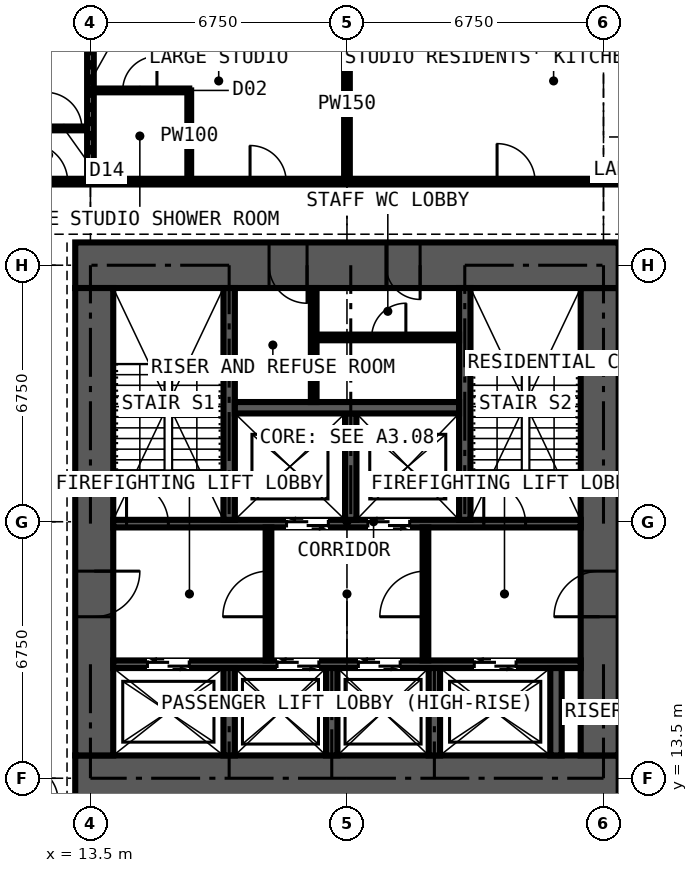
"""IFC4 building model, lengths in metres.
Left out: names, types, materials, properties, quantities, classifications, styles, units other than length and angle.
Written with IfcOpenShell. Run it as: python <this file> out.ifc"""

import sys

from ifc_helpers import new_model, si_unit, direction, frame, frame_2d, origin, place, context, subcontext, project, spatial, rectangle, extrude, element, fill, save


model = new_model("IFC4")
c1 = context("Model", 3, precision=1e-05, world=origin(), true_north=direction((0.0, 1.0)))
c2 = subcontext(c1, "Body", "Model", "MODEL_VIEW")
j1 = project(units=[si_unit("LENGTHUNIT", "METRE"), si_unit("PLANEANGLEUNIT", "RADIAN")], contexts=[c1])
p1 = place(None, origin())
s1 = spatial("IfcSite", under=j1, at=p1, CompositionType="ELEMENT")
p2 = place(p1, origin())
s2 = spatial("IfcBuilding", under=s1, at=p2, CompositionType="ELEMENT")
p3 = place(p2, frame((0.0, 0.0, 196.2)))
s3 = spatial("IfcBuildingStorey", under=s2, at=p3, CompositionType="ELEMENT", Elevation=196.2)
p4 = place(p3, frame((13.1, 13.5, 0.0), z_axis=(0.0, 0.0, 1.0), x_axis=(1.0, 0.0, 0.0)))
e1 = element("IfcWall", 1, at=p4, inside=s3, PredefinedType="SHEAR", context=c2, shape_type="SweptSolid", body=[
    extrude(rectangle(XDim=14.3, YDim=1.2, at=frame_2d((7.15, 0.0))), origin(), (0.0, 0.0, 1.0), 3.6),
])
p5 = place(p3, frame((26.9, 14.1, 0.0), z_axis=(0.0, 0.0, 1.0), x_axis=(0.0, 1.0, 0.0)))
e2 = element("IfcWall", 2, at=p5, inside=s3, PredefinedType="SHEAR", context=c2, shape_type="SweptSolid", body=[
    extrude(rectangle(XDim=12.3, YDim=1.0, at=frame_2d((6.15, 0.0))), origin(), (0.0, 0.0, 1.0), 3.6),
])
p6 = place(p5, frame((3.65, 0.0, 0.0)))
e3 = element("IfcOpeningElement", 3, at=p6, cuts=e2, PredefinedType="OPENING", context=c2, shape_type="SweptSolid", body=[
    extrude(rectangle(XDim=1.2, YDim=2.2, at=frame_2d((0.6, 1.1))), frame((0.0, 0.51, 0.0), z_axis=(0.0, -1.0, 0.0), x_axis=(1.0, 0.0, 0.0)), (0.0, 0.0, 1.0), 1.02),
])
p7 = place(p3, frame((27.4, 27.0, 0.0), z_axis=(0.0, 0.0, 1.0), x_axis=(-1.0, 0.0, 0.0)))
e4 = element("IfcWall", 4, at=p7, inside=s3, PredefinedType="SHEAR", context=c2, shape_type="SweptSolid", body=[
    extrude(rectangle(XDim=14.3, YDim=1.2, at=frame_2d((7.15, 0.0))), origin(), (0.0, 0.0, 1.0), 3.6),
])
p8 = place(p7, frame((5.225, 0.0, 0.0)))
e5 = element("IfcOpeningElement", 5, at=p8, cuts=e4, PredefinedType="OPENING", context=c2, shape_type="SweptSolid", body=[
    extrude(rectangle(XDim=0.9, YDim=2.2, at=frame_2d((0.45, 1.1))), frame((0.0, 0.61, 0.0), z_axis=(0.0, -1.0, 0.0), x_axis=(1.0, 0.0, 0.0)), (0.0, 0.0, 1.0), 1.22),
])
p9 = place(p7, frame((8.2, 0.0, 0.0)))
e6 = element("IfcOpeningElement", 6, at=p9, cuts=e4, PredefinedType="OPENING", context=c2, shape_type="SweptSolid", body=[
    extrude(rectangle(XDim=1.0, YDim=2.2, at=frame_2d((0.5, 1.1))), frame((0.0, 0.61, 0.0), z_axis=(0.0, -1.0, 0.0), x_axis=(1.0, 0.0, 0.0)), (0.0, 0.0, 1.0), 1.22),
])
p10 = place(p3, frame((13.6, 26.4, 0.0), z_axis=(0.0, 0.0, 1.0), x_axis=(0.0, -1.0, 0.0)))
e7 = element("IfcWall", 7, at=p10, inside=s3, PredefinedType="SHEAR", context=c2, shape_type="SweptSolid", body=[
    extrude(rectangle(XDim=12.3, YDim=1.0, at=frame_2d((6.15, 0.0))), origin(), (0.0, 0.0, 1.0), 3.6),
])
p11 = place(p10, frame((7.45, 0.0, 0.0)))
e8 = element("IfcOpeningElement", 8, at=p11, cuts=e7, PredefinedType="OPENING", context=c2, shape_type="SweptSolid", body=[
    extrude(rectangle(XDim=1.2, YDim=2.2, at=frame_2d((0.6, 1.1))), frame((0.0, 0.51, 0.0), z_axis=(0.0, -1.0, 0.0), x_axis=(1.0, 0.0, 0.0)), (0.0, 0.0, 1.0), 1.02),
])
p12 = place(p3, frame((14.1, 16.5, 0.0), z_axis=(0.0, 0.0, 1.0), x_axis=(1.0, 0.0, 0.0)))
e9 = element("IfcWall", 9, at=p12, inside=s3, PredefinedType="SHEAR", context=c2, shape_type="SweptSolid", body=[
    extrude(rectangle(XDim=12.3, YDim=0.2, at=frame_2d((6.15, 0.0))), origin(), (0.0, 0.0, 1.0), 3.6),
])
p13 = place(p12, frame((0.9, 0.0, 0.0)))
e10 = element("IfcOpeningElement", 10, at=p13, cuts=e9, PredefinedType="OPENING", context=c2, shape_type="SweptSolid", body=[
    extrude(rectangle(XDim=1.1, YDim=2.2, at=frame_2d((0.55, 1.1))), frame((0.0, 0.11, 0.0), z_axis=(0.0, -1.0, 0.0), x_axis=(1.0, 0.0, 0.0)), (0.0, 0.0, 1.0), 0.22),
])
p14 = place(p12, frame((4.31, 0.0, 0.0)))
e11 = element("IfcOpeningElement", 11, at=p14, cuts=e9, PredefinedType="OPENING", context=c2, shape_type="SweptSolid", body=[
    extrude(rectangle(XDim=1.1, YDim=2.2, at=frame_2d((0.55, 1.1))), frame((0.0, 0.11, 0.0), z_axis=(0.0, -1.0, 0.0), x_axis=(1.0, 0.0, 0.0)), (0.0, 0.0, 1.0), 0.22),
])
p15 = place(p12, frame((6.45, 0.0, 0.0)))
e12 = element("IfcOpeningElement", 12, at=p15, cuts=e9, PredefinedType="OPENING", context=c2, shape_type="SweptSolid", body=[
    extrude(rectangle(XDim=1.1, YDim=2.2, at=frame_2d((0.55, 1.1))), frame((0.0, 0.11, 0.0), z_axis=(0.0, -1.0, 0.0), x_axis=(1.0, 0.0, 0.0)), (0.0, 0.0, 1.0), 0.22),
])
p16 = place(p12, frame((9.5, 0.0, 0.0)))
e13 = element("IfcOpeningElement", 13, at=p16, cuts=e9, PredefinedType="OPENING", context=c2, shape_type="SweptSolid", body=[
    extrude(rectangle(XDim=1.1, YDim=2.2, at=frame_2d((0.55, 1.1))), frame((0.0, 0.11, 0.0), z_axis=(0.0, -1.0, 0.0), x_axis=(1.0, 0.0, 0.0)), (0.0, 0.0, 1.0), 0.22),
])
p17 = place(p3, frame((14.1, 20.2, 0.0), z_axis=(0.0, 0.0, 1.0), x_axis=(1.0, 0.0, 0.0)))
e14 = element("IfcWall", 14, at=p17, inside=s3, PredefinedType="SHEAR", context=c2, shape_type="SweptSolid", body=[
    extrude(rectangle(XDim=12.3, YDim=0.2, at=frame_2d((6.15, 0.0))), origin(), (0.0, 0.0, 1.0), 3.6),
])
p18 = place(p17, frame((4.56, 0.0, 0.0)))
e15 = element("IfcOpeningElement", 15, at=p18, cuts=e14, PredefinedType="OPENING", context=c2, shape_type="SweptSolid", body=[
    extrude(rectangle(XDim=1.1, YDim=2.2, at=frame_2d((0.55, 1.1))), frame((0.0, 0.11, 0.0), z_axis=(0.0, -1.0, 0.0), x_axis=(1.0, 0.0, 0.0)), (0.0, 0.0, 1.0), 0.22),
])
p19 = place(p17, frame((6.7, 0.0, 0.0)))
e16 = element("IfcOpeningElement", 16, at=p19, cuts=e14, PredefinedType="OPENING", context=c2, shape_type="SweptSolid", body=[
    extrude(rectangle(XDim=1.1, YDim=2.2, at=frame_2d((0.55, 1.1))), frame((0.0, 0.11, 0.0), z_axis=(0.0, -1.0, 0.0), x_axis=(1.0, 0.0, 0.0)), (0.0, 0.0, 1.0), 0.22),
])
p20 = place(p17, frame((0.35, 0.0, 0.0)))
e17 = element("IfcOpeningElement", 17, at=p20, cuts=e14, PredefinedType="OPENING", context=c2, shape_type="SweptSolid", body=[
    extrude(rectangle(XDim=1.1, YDim=2.2, at=frame_2d((0.55, 1.1))), frame((0.0, 0.11, 0.0), z_axis=(0.0, -1.0, 0.0), x_axis=(1.0, 0.0, 0.0)), (0.0, 0.0, 1.0), 0.22),
])
p21 = place(p17, frame((9.75, 0.0, 0.0)))
e18 = element("IfcOpeningElement", 18, at=p21, cuts=e14, PredefinedType="OPENING", context=c2, shape_type="SweptSolid", body=[
    extrude(rectangle(XDim=1.1, YDim=2.2, at=frame_2d((0.55, 1.1))), frame((0.0, 0.11, 0.0), z_axis=(0.0, -1.0, 0.0), x_axis=(1.0, 0.0, 0.0)), (0.0, 0.0, 1.0), 0.22),
])
for number, where, z_axis, x_axis in (
    (19, (17.15, 20.3, 0.0), (0.0, 0.0, 1.0), (0.0, 1.0, 0.0)),
    (20, (23.35, 20.3, 0.0), (0.0, 0.0, 1.0), (0.0, 1.0, 0.0)),
):
    element("IfcWall", number, at=place(p3, frame(where, z_axis=z_axis, x_axis=x_axis)), inside=s3, PredefinedType="SHEAR", context=c2, shape_type="SweptSolid", body=[
        extrude(rectangle(XDim=6.1, YDim=0.3, at=frame_2d((3.05, 0.0))), origin(), (0.0, 0.0, 1.0), 3.6),
    ])
p22 = place(p3, frame((20.35, 20.3, 0.0), z_axis=(0.0, 0.0, 1.0), x_axis=(0.0, 1.0, 0.0)))
e21 = element("IfcWall", 21, at=p22, inside=s3, PredefinedType="SHEAR", context=c2, shape_type="SweptSolid", body=[
    extrude(rectangle(XDim=2.8, YDim=0.3, at=frame_2d((1.4, 0.0))), origin(), (0.0, 0.0, 1.0), 3.6),
])
p23 = place(p3, frame((17.3, 23.25, 0.0), z_axis=(0.0, 0.0, 1.0), x_axis=(1.0, 0.0, 0.0)))
e22 = element("IfcWall", 22, at=p23, inside=s3, PredefinedType="SHEAR", context=c2, shape_type="SweptSolid", body=[
    extrude(rectangle(XDim=5.9, YDim=0.3, at=frame_2d((2.95, 0.0))), origin(), (0.0, 0.0, 1.0), 3.6),
])
for number, where, z_axis, x_axis in (
    (23, (17.15, 14.1, 0.0), (0.0, 0.0, 1.0), (0.0, 1.0, 0.0)),
    (24, (19.85, 14.1, 0.0), (0.0, 0.0, 1.0), (0.0, 1.0, 0.0)),
    (25, (22.55, 14.1, 0.0), (0.0, 0.0, 1.0), (0.0, 1.0, 0.0)),
    (26, (25.75, 14.1, 0.0), (0.0, 0.0, 1.0), (0.0, 1.0, 0.0)),
):
    element("IfcWall", number, at=place(p3, frame(where, z_axis=z_axis, x_axis=x_axis)), inside=s3, PredefinedType="SHEAR", context=c2, shape_type="SweptSolid", body=[
        extrude(rectangle(XDim=2.3, YDim=0.3, at=frame_2d((1.15, 0.0))), origin(), (0.0, 0.0, 1.0), 3.6),
    ])
p24 = place(p3, frame((18.185, 16.6, 0.0), z_axis=(0.0, 0.0, 1.0), x_axis=(0.0, 1.0, 0.0)))
e27 = element("IfcWall", 27, at=p24, inside=s3, PredefinedType="PARTITIONING", context=c2, shape_type="SweptSolid", body=[
    extrude(rectangle(XDim=3.5, YDim=0.15, at=frame_2d((1.75, 0.0))), origin(), (0.0, 0.0, 1.0), 3.3),
])
p25 = place(p24, frame((1.15, 0.0, 0.0)))
e28 = element("IfcOpeningElement", 28, at=p25, cuts=e27, PredefinedType="OPENING", context=c2, shape_type="SweptSolid", body=[
    extrude(rectangle(XDim=1.2, YDim=2.2, at=frame_2d((0.6, 1.1))), frame((0.0, 0.085, 0.0), z_axis=(0.0, -1.0, 0.0), x_axis=(1.0, 0.0, 0.0)), (0.0, 0.0, 1.0), 0.17),
])
p26 = place(p3, frame((22.315, 16.6, 0.0), z_axis=(0.0, 0.0, 1.0), x_axis=(0.0, 1.0, 0.0)))
e29 = element("IfcWall", 29, at=p26, inside=s3, PredefinedType="PARTITIONING", context=c2, shape_type="SweptSolid", body=[
    extrude(rectangle(XDim=3.5, YDim=0.15, at=frame_2d((1.75, 0.0))), origin(), (0.0, 0.0, 1.0), 3.3),
])
p27 = place(p26, frame((1.15, 0.0, 0.0)))
e30 = element("IfcOpeningElement", 30, at=p27, cuts=e29, PredefinedType="OPENING", context=c2, shape_type="SweptSolid", body=[
    extrude(rectangle(XDim=1.2, YDim=2.2, at=frame_2d((0.6, 1.1))), frame((0.0, 0.085, 0.0), z_axis=(0.0, -1.0, 0.0), x_axis=(1.0, 0.0, 0.0)), (0.0, 0.0, 1.0), 0.17),
])
p28 = place(p3, frame((19.375, 23.4, 0.0), z_axis=(0.0, 0.0, 1.0), x_axis=(0.0, 1.0, 0.0)))
e31 = element("IfcWall", 31, at=p28, inside=s3, PredefinedType="PARTITIONING", context=c2, shape_type="SweptSolid", body=[
    extrude(rectangle(XDim=3.0, YDim=0.15, at=frame_2d((1.5, 0.0))), origin(), (0.0, 0.0, 1.0), 3.3),
])
p29 = place(p3, frame((19.45, 25.1, 0.0), z_axis=(0.0, 0.0, 1.0), x_axis=(1.0, 0.0, 0.0)))
e32 = element("IfcWall", 32, at=p29, inside=s3, PredefinedType="PARTITIONING", context=c2, shape_type="SweptSolid", body=[
    extrude(rectangle(XDim=3.75, YDim=0.15, at=frame_2d((1.875, 0.0))), origin(), (0.0, 0.0, 1.0), 3.3),
])
p30 = place(p29, frame((1.45, 0.0, 0.0)))
e33 = element("IfcOpeningElement", 33, at=p30, cuts=e32, PredefinedType="OPENING", context=c2, shape_type="SweptSolid", body=[
    extrude(rectangle(XDim=0.9, YDim=2.2, at=frame_2d((0.45, 1.1))), frame((0.0, 0.085, 0.0), z_axis=(0.0, -1.0, 0.0), x_axis=(1.0, 0.0, 0.0)), (0.0, 0.0, 1.0), 0.17),
])
p31 = place(p3, frame((10.125, 30.6, 0.0), z_axis=(0.0, 0.0, 1.0), x_axis=(1.0, 0.0, 0.0)))
e34 = element("IfcWall", 34, at=p31, inside=s3, PredefinedType="PARTITIONING", context=c2, shape_type="SweptSolid", body=[
    extrude(rectangle(XDim=3.375, YDim=0.1, at=frame_2d((1.688, 0.0))), origin(), (0.0, 0.0, 1.0), 3.3),
])
p32 = place(p31, frame((2.2, 0.0, 0.0)))
e35 = element("IfcOpeningElement", 35, at=p32, cuts=e34, PredefinedType="OPENING", context=c2, shape_type="SweptSolid", body=[
    extrude(rectangle(XDim=0.95, YDim=2.2, at=frame_2d((0.475, 1.1))), frame((0.0, 0.06, 0.0), z_axis=(0.0, -1.0, 0.0), x_axis=(1.0, 0.0, 0.0)), (0.0, 0.0, 1.0), 0.12),
])
p33 = place(p3, frame((11.3, 29.2, 0.0), z_axis=(0.0, 0.0, 1.0), x_axis=(1.0, 0.0, 0.0)))
e36 = element("IfcWall", 36, at=p33, inside=s3, PredefinedType="PARTITIONING", context=c2, shape_type="SweptSolid", body=[
    extrude(rectangle(XDim=19.809, YDim=0.15, at=frame_2d((9.904, 0.0))), origin(), (0.0, 0.0, 1.0), 3.3),
])
p34 = place(p33, frame((12.9, 0.0, 0.0)))
e37 = element("IfcOpeningElement", 37, at=p34, cuts=e36, PredefinedType="OPENING", context=c2, shape_type="SweptSolid", body=[
    extrude(rectangle(XDim=1.0, YDim=2.2, at=frame_2d((0.5, 1.1))), frame((0.0, 0.085, 0.0), z_axis=(0.0, -1.0, 0.0), x_axis=(1.0, 0.0, 0.0)), (0.0, 0.0, 1.0), 0.17),
])
p35 = place(p33, frame((6.4, 0.0, 0.0)))
e38 = element("IfcOpeningElement", 38, at=p35, cuts=e36, PredefinedType="OPENING", context=c2, shape_type="SweptSolid", body=[
    extrude(rectangle(XDim=0.95, YDim=2.2, at=frame_2d((0.475, 1.1))), frame((0.0, 0.085, 0.0), z_axis=(0.0, -1.0, 0.0), x_axis=(1.0, 0.0, 0.0)), (0.0, 0.0, 1.0), 0.17),
])
p36 = place(p33, frame((0.6, 0.0, 0.0)))
e39 = element("IfcOpeningElement", 39, at=p36, cuts=e36, PredefinedType="OPENING", context=c2, shape_type="SweptSolid", body=[
    extrude(rectangle(XDim=1.0, YDim=2.2, at=frame_2d((0.5, 1.1))), frame((0.0, 0.085, 0.0), z_axis=(0.0, -1.0, 0.0), x_axis=(1.0, 0.0, 0.0)), (0.0, 0.0, 1.0), 0.17),
])
p37 = place(p3, frame((13.5, 29.2, 0.0), z_axis=(0.0, 0.0, 1.0), x_axis=(0.0, 1.0, 0.0)))
e40 = element("IfcWall", 40, at=p37, inside=s3, PredefinedType="PARTITIONING", context=c2, shape_type="SweptSolid", body=[
    extrude(rectangle(XDim=5.284, YDim=0.175, at=frame_2d((2.642, 0.0))), origin(), (0.0, 0.0, 1.0), 2.802),
])
p38 = place(p3, frame((13.5, 31.6, 0.0), z_axis=(0.0, 0.0, 1.0), x_axis=(1.0, 0.0, 0.0)))
e41 = element("IfcWall", 41, at=p38, inside=s3, PredefinedType="PARTITIONING", context=c2, shape_type="SweptSolid", body=[
    extrude(rectangle(XDim=2.6, YDim=0.1, at=frame_2d((1.3, 0.0))), origin(), (0.0, 0.0, 1.0), 3.3),
])
p39 = place(p38, frame((0.85, 0.0, 0.0)))
e42 = element("IfcOpeningElement", 42, at=p39, cuts=e41, PredefinedType="OPENING", context=c2, shape_type="SweptSolid", body=[
    extrude(rectangle(XDim=0.9, YDim=2.2, at=frame_2d((0.45, 1.1))), frame((0.0, 0.06, 0.0), z_axis=(0.0, -1.0, 0.0), x_axis=(1.0, 0.0, 0.0)), (0.0, 0.0, 1.0), 0.12),
])
p40 = place(p3, frame((16.1, 29.2, 0.0), z_axis=(0.0, 0.0, 1.0), x_axis=(0.0, 1.0, 0.0)))
e43 = element("IfcWall", 43, at=p40, inside=s3, PredefinedType="PARTITIONING", context=c2, shape_type="SweptSolid", body=[
    extrude(rectangle(XDim=2.4, YDim=0.1, at=frame_2d((1.2, 0.0))), origin(), (0.0, 0.0, 1.0), 3.3),
])
p41 = place(p3, frame((20.25, 29.2, 0.0), z_axis=(0.0, 0.0, 1.0), x_axis=(0.0, 1.0, 0.0)))
e44 = element("IfcWall", 44, at=p41, inside=s3, PredefinedType="PARTITIONING", context=c2, shape_type="SweptSolid", body=[
    extrude(rectangle(XDim=5.284, YDim=0.15, at=frame_2d((2.642, 0.0))), origin(), (0.0, 0.0, 1.0), 2.802),
])
p42 = place(p13, origin())
e45 = element("IfcDoor", 45, at=p42, inside=s3, OperationType="DOUBLE_DOOR_SLIDING", PredefinedType="DOOR", context=c2, shape_type="SweptSolid", body=[
    extrude(rectangle(XDim=1.1, YDim=2.2, at=frame_2d((0.55, 1.1))), frame((0.0, 0.025, 0.0), z_axis=(0.0, -1.0, 0.0), x_axis=(1.0, 0.0, 0.0)), (0.0, 0.0, 1.0), 0.05),
])
fill(e10, e45)
p43 = place(p14, origin())
e46 = element("IfcDoor", 46, at=p43, inside=s3, OperationType="DOUBLE_DOOR_SLIDING", PredefinedType="DOOR", context=c2, shape_type="SweptSolid", body=[
    extrude(rectangle(XDim=1.1, YDim=2.2, at=frame_2d((0.55, 1.1))), frame((0.0, 0.025, 0.0), z_axis=(0.0, -1.0, 0.0), x_axis=(1.0, 0.0, 0.0)), (0.0, 0.0, 1.0), 0.05),
])
fill(e11, e46)
p44 = place(p15, origin())
e47 = element("IfcDoor", 47, at=p44, inside=s3, OperationType="DOUBLE_DOOR_SLIDING", PredefinedType="DOOR", context=c2, shape_type="SweptSolid", body=[
    extrude(rectangle(XDim=1.1, YDim=2.2, at=frame_2d((0.55, 1.1))), frame((0.0, 0.025, 0.0), z_axis=(0.0, -1.0, 0.0), x_axis=(1.0, 0.0, 0.0)), (0.0, 0.0, 1.0), 0.05),
])
fill(e12, e47)
p45 = place(p16, origin())
e48 = element("IfcDoor", 48, at=p45, inside=s3, OperationType="DOUBLE_DOOR_SLIDING", PredefinedType="DOOR", context=c2, shape_type="SweptSolid", body=[
    extrude(rectangle(XDim=1.1, YDim=2.2, at=frame_2d((0.55, 1.1))), frame((0.0, 0.025, 0.0), z_axis=(0.0, -1.0, 0.0), x_axis=(1.0, 0.0, 0.0)), (0.0, 0.0, 1.0), 0.05),
])
fill(e13, e48)
p46 = place(p18, origin())
e49 = element("IfcDoor", 49, at=p46, inside=s3, OperationType="DOUBLE_DOOR_SLIDING", PredefinedType="DOOR", context=c2, shape_type="SweptSolid", body=[
    extrude(rectangle(XDim=1.1, YDim=2.2, at=frame_2d((0.55, 1.1))), frame((0.0, 0.025, 0.0), z_axis=(0.0, -1.0, 0.0), x_axis=(1.0, 0.0, 0.0)), (0.0, 0.0, 1.0), 0.05),
])
fill(e15, e49)
p47 = place(p19, origin())
e50 = element("IfcDoor", 50, at=p47, inside=s3, OperationType="DOUBLE_DOOR_SLIDING", PredefinedType="DOOR", context=c2, shape_type="SweptSolid", body=[
    extrude(rectangle(XDim=1.1, YDim=2.2, at=frame_2d((0.55, 1.1))), frame((0.0, 0.025, 0.0), z_axis=(0.0, -1.0, 0.0), x_axis=(1.0, 0.0, 0.0)), (0.0, 0.0, 1.0), 0.05),
])
fill(e16, e50)
p48 = place(p11, origin())
e51 = element("IfcDoor", 51, at=p48, inside=s3, OperationType="DOUBLE_DOOR_SINGLE_SWING", PredefinedType="DOOR", context=c2, shape_type="SweptSolid", body=[
    extrude(rectangle(XDim=1.2, YDim=2.2, at=frame_2d((0.6, 1.1))), frame((0.0, 0.025, 0.0), z_axis=(0.0, -1.0, 0.0), x_axis=(1.0, 0.0, 0.0)), (0.0, 0.0, 1.0), 0.05),
])
fill(e8, e51)
p49 = place(p6, origin())
e52 = element("IfcDoor", 52, at=p49, inside=s3, OperationType="DOUBLE_DOOR_SINGLE_SWING", PredefinedType="DOOR", context=c2, shape_type="SweptSolid", body=[
    extrude(rectangle(XDim=1.2, YDim=2.2, at=frame_2d((0.6, 1.1))), frame((0.0, 0.025, 0.0), z_axis=(0.0, -1.0, 0.0), x_axis=(1.0, 0.0, 0.0)), (0.0, 0.0, 1.0), 0.05),
])
fill(e3, e52)
p50 = place(p25, origin())
e53 = element("IfcDoor", 53, at=p50, inside=s3, OperationType="DOUBLE_DOOR_SINGLE_SWING", PredefinedType="DOOR", context=c2, shape_type="SweptSolid", body=[
    extrude(rectangle(XDim=1.2, YDim=2.2, at=frame_2d((0.6, 1.1))), frame((0.0, 0.025, 0.0), z_axis=(0.0, -1.0, 0.0), x_axis=(1.0, 0.0, 0.0)), (0.0, 0.0, 1.0), 0.05),
])
fill(e28, e53)
p51 = place(p27, origin())
e54 = element("IfcDoor", 54, at=p51, inside=s3, OperationType="DOUBLE_DOOR_SINGLE_SWING", PredefinedType="DOOR", context=c2, shape_type="SweptSolid", body=[
    extrude(rectangle(XDim=1.2, YDim=2.2, at=frame_2d((0.6, 1.1))), frame((0.0, 0.025, 0.0), z_axis=(0.0, -1.0, 0.0), x_axis=(1.0, 0.0, 0.0)), (0.0, 0.0, 1.0), 0.05),
])
fill(e30, e54)
p52 = place(p30, origin())
e55 = element("IfcDoor", 55, at=p52, inside=s3, OperationType="SINGLE_SWING_RIGHT", PredefinedType="DOOR", context=c2, shape_type="SweptSolid", body=[
    extrude(rectangle(XDim=0.9, YDim=2.2, at=frame_2d((0.45, 1.1))), frame((0.0, 0.025, 0.0), z_axis=(0.0, -1.0, 0.0), x_axis=(1.0, 0.0, 0.0)), (0.0, 0.0, 1.0), 0.05),
])
fill(e33, e55)
p53 = place(p8, origin())
e56 = element("IfcDoor", 56, at=p53, inside=s3, OperationType="SINGLE_SWING_LEFT", PredefinedType="DOOR", context=c2, shape_type="SweptSolid", body=[
    extrude(rectangle(XDim=0.9, YDim=2.2, at=frame_2d((0.45, 1.1))), frame((0.0, 0.4, 0.0), z_axis=(0.0, -1.0, 0.0), x_axis=(1.0, 0.0, 0.0)), (0.0, 0.0, 1.0), 0.8),
])
fill(e5, e56)
p54 = place(p9, origin())
e57 = element("IfcDoor", 57, at=p54, inside=s3, OperationType="SINGLE_SWING_LEFT", PredefinedType="DOOR", context=c2, shape_type="SweptSolid", body=[
    extrude(rectangle(XDim=1.0, YDim=2.2, at=frame_2d((0.5, 1.1))), frame((0.0, 0.025, 0.0), z_axis=(0.0, -1.0, 0.0), x_axis=(1.0, 0.0, 0.0)), (0.0, 0.0, 1.0), 0.05),
])
fill(e6, e57)
p55 = place(p20, origin())
e58 = element("IfcDoor", 58, at=p55, inside=s3, OperationType="SINGLE_SWING_LEFT", PredefinedType="DOOR", context=c2, shape_type="SweptSolid", body=[
    extrude(rectangle(XDim=1.1, YDim=2.2, at=frame_2d((0.55, 1.1))), frame((0.0, 0.025, 0.0), z_axis=(0.0, -1.0, 0.0), x_axis=(1.0, 0.0, 0.0)), (0.0, 0.0, 1.0), 0.05),
])
fill(e17, e58)
p56 = place(p21, origin())
e59 = element("IfcDoor", 59, at=p56, inside=s3, OperationType="SINGLE_SWING_LEFT", PredefinedType="DOOR", context=c2, shape_type="SweptSolid", body=[
    extrude(rectangle(XDim=1.1, YDim=2.2, at=frame_2d((0.55, 1.1))), frame((0.0, 0.025, 0.0), z_axis=(0.0, -1.0, 0.0), x_axis=(1.0, 0.0, 0.0)), (0.0, 0.0, 1.0), 0.05),
])
fill(e18, e59)
p57 = place(p34, origin())
e60 = element("IfcDoor", 60, at=p57, inside=s3, OperationType="SINGLE_SWING_LEFT", PredefinedType="DOOR", context=c2, shape_type="SweptSolid", body=[
    extrude(rectangle(XDim=1.0, YDim=2.2, at=frame_2d((0.5, 1.1))), frame((0.0, 0.025, 0.0), z_axis=(0.0, -1.0, 0.0), x_axis=(1.0, 0.0, 0.0)), (0.0, 0.0, 1.0), 0.05),
])
fill(e37, e60)
p58 = place(p35, origin())
e61 = element("IfcDoor", 61, at=p58, inside=s3, OperationType="SINGLE_SWING_LEFT", PredefinedType="DOOR", context=c2, shape_type="SweptSolid", body=[
    extrude(rectangle(XDim=0.95, YDim=2.2, at=frame_2d((0.475, 1.1))), frame((0.0, 0.025, 0.0), z_axis=(0.0, -1.0, 0.0), x_axis=(1.0, 0.0, 0.0)), (0.0, 0.0, 1.0), 0.05),
])
fill(e38, e61)
p59 = place(p39, origin())
e62 = element("IfcDoor", 62, at=p59, inside=s3, OperationType="SINGLE_SWING_RIGHT", PredefinedType="DOOR", context=c2, shape_type="SweptSolid", body=[
    extrude(rectangle(XDim=0.9, YDim=2.2, at=frame_2d((0.45, 1.1))), frame((0.0, 0.025, 0.0), z_axis=(0.0, -1.0, 0.0), x_axis=(1.0, 0.0, 0.0)), (0.0, 0.0, 1.0), 0.05),
])
fill(e42, e62)
p60 = place(p32, origin())
e63 = element("IfcDoor", 63, at=p60, inside=s3, OperationType="SINGLE_SWING_LEFT", PredefinedType="DOOR", context=c2, shape_type="SweptSolid", body=[
    extrude(rectangle(XDim=0.95, YDim=2.2, at=frame_2d((0.475, 1.1))), frame((0.0, 0.025, 0.0), z_axis=(0.0, -1.0, 0.0), x_axis=(1.0, 0.0, 0.0)), (0.0, 0.0, 1.0), 0.05),
])
fill(e35, e63)
p61 = place(p36, origin())
e64 = element("IfcDoor", 64, at=p61, inside=s3, OperationType="SINGLE_SWING_LEFT", PredefinedType="DOOR", context=c2, shape_type="SweptSolid", body=[
    extrude(rectangle(XDim=1.0, YDim=2.2, at=frame_2d((0.5, 1.1))), frame((0.0, 0.025, 0.0), z_axis=(0.0, -1.0, 0.0), x_axis=(1.0, 0.0, 0.0)), (0.0, 0.0, 1.0), 0.05),
])
fill(e39, e64)
save(model, sys.argv[1])
